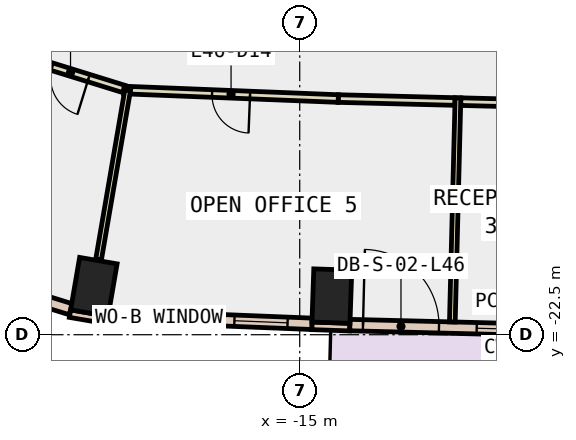
"""IFC4 building model, lengths in metres.
Left out: names, types, materials, properties, quantities, classifications, styles, units other than length and angle.
Written with IfcOpenShell. Run it as: python <this file> out.ifc"""

import sys

from ifc_helpers import new_model, si_unit, direction, frame, frame_2d, origin, origin_2d, place, context, subcontext, project, spatial, rectangle, extrude, element, fill, save


model = new_model("IFC4")
c1 = context("Model", 3, precision=1e-05, world=origin(), true_north=direction((0.0, 1.0)))
c2 = subcontext(c1, "Body", "Model", "MODEL_VIEW")
j1 = project(units=[si_unit("LENGTHUNIT", "METRE"), si_unit("PLANEANGLEUNIT", "RADIAN")], contexts=[c1])
p1 = place(None, origin())
s1 = spatial("IfcSite", under=j1, at=p1, CompositionType="ELEMENT")
p2 = place(p1, origin())
s2 = spatial("IfcBuilding", under=s1, at=p2, CompositionType="ELEMENT")
p3 = place(p2, frame((0.0, 0.0, 206.6)))
s3 = spatial("IfcBuildingStorey", under=s2, at=p3, CompositionType="ELEMENT", Elevation=206.6)
for number, where, z_axis, x_axis in (
    (1, (-20.417, -21.241, -0.4), (0.0, 0.0, 1.0), (-0.986, 0.169, 0.0)),
    (2, (-14.154, -21.484, -0.4), (0.0, 0.0, 1.0), (-0.999, 0.034, 0.0)),
):
    element("IfcColumn", number, at=place(p3, frame(where, z_axis=z_axis, x_axis=x_axis)), inside=s3, PredefinedType="COLUMN", context=c2, shape_type="SweptSolid", body=[
        extrude(rectangle(XDim=1.0, YDim=1.4, at=origin_2d()), origin(), (0.0, 0.0, 1.0), 4.2),
    ])
p4 = place(p3, frame((-21.045, -21.945, 0.0), z_axis=(0.0, 0.0, 1.0), x_axis=(0.985631544579, -0.168909615862, 0.0)))
e3 = element("IfcWall", 3, at=p4, inside=s3, PredefinedType="STANDARD", context=c2, shape_type="SweptSolid", body=[
    extrude(rectangle(XDim=1.0, YDim=0.2, at=frame_2d((0.5, 0.0))), origin(), (0.0, 0.0, 1.0), 3.8),
])
p5 = place(p3, frame((-14.681, -22.266, 0.0), z_axis=(0.0, 0.0, 1.0), x_axis=(0.999423561854, -0.033949138587, 0.0)))
e4 = element("IfcWall", 4, at=p5, inside=s3, PredefinedType="STANDARD", context=c2, shape_type="SweptSolid", body=[
    extrude(rectangle(XDim=1.0, YDim=0.2, at=frame_2d((0.5, 0.0))), origin(), (0.0, 0.0, 1.0), 3.8),
])
p6 = place(p3, frame((-20.04, -21.999, 0.0), z_axis=(0.0, 0.0, 1.0), x_axis=(0.999205241612, -0.039860822062, 0.0)))
e5 = element("IfcWall", 5, at=p6, inside=s3, PredefinedType="STANDARD", context=c2, shape_type="SweptSolid", body=[
    extrude(rectangle(XDim=5.365, YDim=0.3, at=frame_2d((2.683, 0.0))), origin(), (0.0, 0.0, 1.0), 3.8),
])
p7 = place(p6, frame((0.641, 0.0, 0.9)))
e6 = element("IfcOpeningElement", 6, at=p7, cuts=e5, PredefinedType="OPENING", context=c2, shape_type="SweptSolid", body=[
    extrude(rectangle(XDim=1.4, YDim=2.6, at=frame_2d((0.7, 1.3))), frame((0.0, 0.16, 0.0), z_axis=(0.0, -1.0, 0.0), x_axis=(1.0, 0.0, 0.0)), (0.0, 0.0, 1.0), 0.32),
])
p8 = place(p6, frame((3.324, 0.0, 0.9)))
e7 = element("IfcOpeningElement", 7, at=p8, cuts=e5, PredefinedType="OPENING", context=c2, shape_type="SweptSolid", body=[
    extrude(rectangle(XDim=1.4, YDim=2.6, at=frame_2d((0.7, 1.3))), frame((0.0, 0.16, 0.0), z_axis=(0.0, -1.0, 0.0), x_axis=(1.0, 0.0, 0.0)), (0.0, 0.0, 1.0), 0.32),
])
p9 = place(p3, frame((-13.681, -22.246, 0.0), z_axis=(0.0, 0.0, 1.0), x_axis=(0.999685717988, -0.025069209235, 0.0)))
e8 = element("IfcWall", 8, at=p9, inside=s3, PredefinedType="STANDARD", context=c2, shape_type="SweptSolid", body=[
    extrude(rectangle(XDim=5.385, YDim=0.3, at=frame_2d((2.693, 0.0))), origin(), (0.0, 0.0, 1.0), 3.8),
])
p10 = place(p9, frame((0.346, 0.0, 0.0)))
e9 = element("IfcOpeningElement", 9, at=p10, cuts=e8, PredefinedType="OPENING", context=c2, shape_type="SweptSolid", body=[
    extrude(rectangle(XDim=2.0, YDim=2.4, at=frame_2d((1.0, 1.2))), frame((0.0, 0.16, 0.0), z_axis=(0.0, -1.0, 0.0), x_axis=(1.0, 0.0, 0.0)), (0.0, 0.0, 1.0), 0.32),
])
p11 = place(p9, frame((3.339, 0.0, 0.9)))
e10 = element("IfcOpeningElement", 10, at=p11, cuts=e8, PredefinedType="OPENING", context=c2, shape_type="SweptSolid", body=[
    extrude(rectangle(XDim=1.4, YDim=2.6, at=frame_2d((0.7, 1.3))), frame((0.0, 0.16, 0.0), z_axis=(0.0, -1.0, 0.0), x_axis=(1.0, 0.0, 0.0)), (0.0, 0.0, 1.0), 0.32),
])
p12 = place(p3, frame((-24.999, -20.599, 0.0), z_axis=(0.0, 0.0, 1.0), x_axis=(0.955247215067, -0.295808651171, 0.0)))
e11 = element("IfcWall", 11, at=p12, inside=s3, PredefinedType="STANDARD", context=c2, shape_type="SweptSolid", body=[
    extrude(rectangle(XDim=4.161, YDim=0.3, at=frame_2d((2.081, 0.0))), origin(), (0.0, 0.0, 1.0), 3.8),
])
p13 = place(p12, frame((1.381, 0.0, 0.9)))
e12 = element("IfcOpeningElement", 12, at=p13, cuts=e11, PredefinedType="OPENING", context=c2, shape_type="SweptSolid", body=[
    extrude(rectangle(XDim=1.4, YDim=2.6, at=frame_2d((0.7, 1.3))), frame((0.0, 0.16, 0.0), z_axis=(0.0, -1.0, 0.0), x_axis=(1.0, 0.0, 0.0)), (0.0, 0.0, 1.0), 0.32),
])
p14 = place(p3, frame((-19.623, -16.035, 0.0), z_axis=(0.0, 0.0, 1.0), x_axis=(-0.955234616163, 0.295849333419, 0.0)))
e13 = element("IfcWall", 13, at=p14, inside=s3, PredefinedType="PARTITIONING", context=c2, shape_type="SweptSolid", body=[
    extrude(rectangle(XDim=2.947, YDim=0.2, at=frame_2d((1.473, 0.0))), origin(), (0.0, 0.0, 1.0), 3.8),
])
p15 = place(p14, frame((0.974, 0.0, 0.0)))
e14 = element("IfcOpeningElement", 14, at=p15, cuts=e13, PredefinedType="OPENING", context=c2, shape_type="SweptSolid", body=[
    extrude(rectangle(XDim=1.0, YDim=2.1, at=frame_2d((0.5, 1.05))), frame((0.0, 0.11, 0.0), z_axis=(0.0, -1.0, 0.0), x_axis=(1.0, 0.0, 0.0)), (0.0, 0.0, 1.0), 0.22),
])
p16 = place(p3, frame((-10.913, -16.364, 0.0), z_axis=(0.0, 0.0, 1.0), x_axis=(-0.999676990694, 0.02541484365, 0.0)))
e15 = element("IfcWall", 15, at=p16, inside=s3, PredefinedType="PARTITIONING", context=c2, shape_type="SweptSolid", body=[
    extrude(rectangle(XDim=3.074, YDim=0.2, at=frame_2d((1.537, 0.0))), origin(), (0.0, 0.0, 1.0), 3.8),
])
p17 = place(p3, frame((-13.986, -16.286, 0.0), z_axis=(0.0, 0.0, 1.0), x_axis=(-0.999206475857, 0.039829870775, 0.0)))
e16 = element("IfcWall", 16, at=p17, inside=s3, PredefinedType="PARTITIONING", context=c2, shape_type="SweptSolid", body=[
    extrude(rectangle(XDim=5.645, YDim=0.2, at=frame_2d((2.823, 0.0))), origin(), (0.0, 0.0, 1.0), 3.8),
])
p18 = place(p17, frame((2.323, 0.0, 0.0)))
e17 = element("IfcOpeningElement", 17, at=p18, cuts=e16, PredefinedType="OPENING", context=c2, shape_type="SweptSolid", body=[
    extrude(rectangle(XDim=1.0, YDim=2.1, at=frame_2d((0.5, 1.05))), frame((0.0, 0.11, 0.0), z_axis=(0.0, -1.0, 0.0), x_axis=(1.0, 0.0, 0.0)), (0.0, 0.0, 1.0), 0.22),
])
p19 = place(p3, frame((-7.9, -16.44, 0.0), z_axis=(0.0, 0.0, 1.0), x_axis=(-0.999675117104, 0.025488433531, 0.0)))
e18 = element("IfcWall", 18, at=p19, inside=s3, PredefinedType="PARTITIONING", context=c2, shape_type="SweptSolid", body=[
    extrude(rectangle(XDim=2.864, YDim=0.2, at=frame_2d((1.432, 0.0))), origin(), (0.0, 0.0, 1.0), 3.8),
])
p20 = place(p3, frame((-19.527, -16.065, 0.0), z_axis=(0.0, 0.0, 1.0), x_axis=(-0.169437821314, -0.985540879268, 0.0)))
e19 = element("IfcWall", 19, at=p20, inside=s3, PredefinedType="PARTITIONING", context=c2, shape_type="SweptSolid", body=[
    extrude(rectangle(XDim=4.531, YDim=0.15, at=frame_2d((2.266, 0.0))), origin(), (0.0, 0.0, 1.0), 3.8),
])
p21 = place(p3, frame((-10.836, -16.266, 0.0), z_axis=(0.0, 0.0, 1.0), x_axis=(-0.025076969416, -0.999685523355, 0.0)))
e20 = element("IfcWall", 20, at=p21, inside=s3, PredefinedType="PARTITIONING", context=c2, shape_type="SweptSolid", body=[
    extrude(rectangle(XDim=5.9, YDim=0.15, at=frame_2d((2.95, 0.0))), origin(), (0.0, 0.0, 1.0), 3.8),
])
p22 = place(p7, origin())
e21 = element("IfcWindow", 21, at=p22, inside=s3, PartitioningType="SINGLE_PANEL", PredefinedType="WINDOW", context=c2, shape_type="SweptSolid", body=[
    extrude(rectangle(XDim=1.4, YDim=2.6, at=frame_2d((0.7, 1.3))), frame((0.0, 0.03, 0.0), z_axis=(0.0, -1.0, 0.0), x_axis=(1.0, 0.0, 0.0)), (0.0, 0.0, 1.0), 0.06),
])
fill(e6, e21)
p23 = place(p8, origin())
e22 = element("IfcWindow", 22, at=p23, inside=s3, PartitioningType="SINGLE_PANEL", PredefinedType="WINDOW", context=c2, shape_type="SweptSolid", body=[
    extrude(rectangle(XDim=1.4, YDim=2.6, at=frame_2d((0.7, 1.3))), frame((0.0, 0.03, 0.0), z_axis=(0.0, -1.0, 0.0), x_axis=(1.0, 0.0, 0.0)), (0.0, 0.0, 1.0), 0.06),
])
fill(e7, e22)
p24 = place(p10, origin())
e23 = element("IfcDoor", 23, at=p24, inside=s3, OperationType="SLIDING_TO_LEFT", PredefinedType="DOOR", context=c2, shape_type="SweptSolid", body=[
    extrude(rectangle(XDim=2.0, YDim=2.4, at=frame_2d((1.0, 1.2))), frame((0.0, 0.025, 0.0), z_axis=(0.0, -1.0, 0.0), x_axis=(1.0, 0.0, 0.0)), (0.0, 0.0, 1.0), 0.05),
])
fill(e9, e23)
p25 = place(p11, origin())
e24 = element("IfcWindow", 24, at=p25, inside=s3, PartitioningType="SINGLE_PANEL", PredefinedType="WINDOW", context=c2, shape_type="SweptSolid", body=[
    extrude(rectangle(XDim=1.4, YDim=2.6, at=frame_2d((0.7, 1.3))), frame((0.0, 0.03, 0.0), z_axis=(0.0, -1.0, 0.0), x_axis=(1.0, 0.0, 0.0)), (0.0, 0.0, 1.0), 0.06),
])
fill(e10, e24)
p26 = place(p15, origin())
e25 = element("IfcDoor", 25, at=p26, inside=s3, OperationType="SINGLE_SWING_LEFT", PredefinedType="DOOR", context=c2, shape_type="SweptSolid", body=[
    extrude(rectangle(XDim=1.0, YDim=2.1, at=frame_2d((0.5, 1.05))), frame((0.0, 0.025, 0.0), z_axis=(0.0, -1.0, 0.0), x_axis=(1.0, 0.0, 0.0)), (0.0, 0.0, 1.0), 0.05),
])
fill(e14, e25)
p27 = place(p18, origin())
e26 = element("IfcDoor", 26, at=p27, inside=s3, OperationType="SINGLE_SWING_LEFT", PredefinedType="DOOR", context=c2, shape_type="SweptSolid", body=[
    extrude(rectangle(XDim=1.0, YDim=2.1, at=frame_2d((0.5, 1.05))), frame((0.0, 0.025, 0.0), z_axis=(0.0, -1.0, 0.0), x_axis=(1.0, 0.0, 0.0)), (0.0, 0.0, 1.0), 0.05),
])
fill(e17, e26)
save(model, sys.argv[1])
